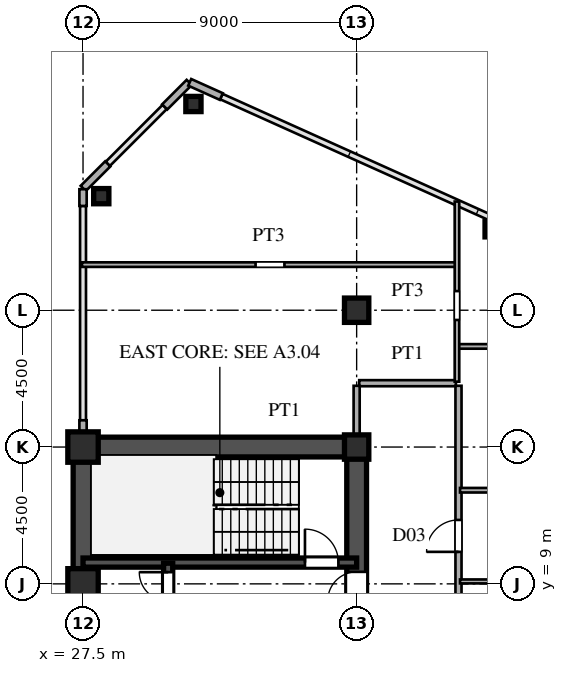
"""IFC4 building model, lengths in metres.
Left out: names, types, materials, properties, quantities, classifications, styles, units other than length and angle.
Written with IfcOpenShell. Run it as: python <this file> out.ifc"""

import sys

from ifc_helpers import new_model, si_unit, direction, frame, frame_2d, origin, origin_2d, place, context, subcontext, project, spatial, rectangle, hollow_rectangle, i_section, extrude, source, transform, mapped, element, fill, save


model = new_model("IFC4")
c1 = context("Model", 3, precision=1e-05, world=origin(), true_north=direction((0.0, 1.0)))
c2 = subcontext(c1, "Body", "Model", "MODEL_VIEW")
j1 = project(units=[si_unit("LENGTHUNIT", "METRE"), si_unit("PLANEANGLEUNIT", "RADIAN")], contexts=[c1])
p1 = place(None, origin())
s1 = spatial("IfcSite", under=j1, at=p1, CompositionType="ELEMENT")
p2 = place(p1, origin())
s2 = spatial("IfcBuilding", under=s1, at=p2, CompositionType="ELEMENT")
p3 = place(p2, frame((0.0, 0.0, 76.5)))
s3 = spatial("IfcBuildingStorey", under=s2, at=p3, CompositionType="ELEMENT", Elevation=76.5)
m1 = source(origin(), c2, "Body", "SweptSolid", [
    extrude(hollow_rectangle(XDim=1.0, YDim=1.0, WallThickness=0.042, at=origin_2d()), origin(), (0.0, 0.0, 1.0), 3.6),
])
for number, where, z_axis, x_axis in (
    (1, (27.5, 9.0, 0.0), (0.0, 0.0, 1.0), (1.0, 0.0, 0.0)),
    (2, (27.5, 13.5, 0.0), (0.0, 0.0, 1.0), (1.0, 0.0, 0.0)),
):
    element("IfcColumn", number, at=place(p3, frame(where, z_axis=z_axis, x_axis=x_axis)), inside=s3, PredefinedType="COLUMN", context=c2, shape_type="MappedRepresentation", body=[
        mapped(m1, transform((0.0, 0.0, 0.0), scale=1.0)),
    ])
m2 = source(origin(), c2, "Body", "SweptSolid", [
    extrude(i_section(OverallWidth=0.8, OverallDepth=0.8, WebThickness=0.032, FlangeThickness=0.05, at=origin_2d()), origin(), (0.0, 0.0, 1.0), 3.6),
])
for number, where, z_axis, x_axis in (
    (3, (36.5, 13.5, 0.0), (0.0, 0.0, 1.0), (1.0, 0.0, 0.0)),
    (4, (36.5, 18.0, 0.0), (0.0, 0.0, 1.0), (1.0, 0.0, 0.0)),
):
    element("IfcColumn", number, at=place(p3, frame(where, z_axis=z_axis, x_axis=x_axis)), inside=s3, PredefinedType="COLUMN", context=c2, shape_type="MappedRepresentation", body=[
        mapped(m2, transform((0.0, 0.0, 0.0), scale=1.0)),
    ])
m3 = source(origin(), c2, "Body", "SweptSolid", [
    extrude(hollow_rectangle(XDim=0.5, YDim=0.5, WallThickness=0.02, at=origin_2d()), origin(), (0.0, 0.0, 1.0), 3.6),
])
for number, where, z_axis, x_axis in (
    (5, (31.131, 24.783, 0.0), (0.0, 0.0, 1.0), (1.0, 0.0, 0.0)),
    (6, (28.1, 21.751, 0.0), (0.0, 0.0, 1.0), (1.0, 0.0, 0.0)),
    (7, (40.973, 20.661, 0.0), (0.0, 0.0, 1.0), (1.0, 0.0, 0.0)),
):
    element("IfcColumn", number, at=place(p3, frame(where, z_axis=z_axis, x_axis=x_axis)), inside=s3, PredefinedType="COLUMN", context=c2, shape_type="MappedRepresentation", body=[
        mapped(m3, transform((0.0, 0.0, 0.0), scale=1.0)),
    ])
p4 = place(p3, frame((32.049, 25.028, 0.0), z_axis=(0.0, 0.0, 1.0), x_axis=(-0.911929519623, 0.410346866979, 0.0)))
e8 = element("IfcWall", 8, at=p4, inside=s3, PredefinedType="SOLIDWALL", context=c2, shape_type="SweptSolid", body=[
    extrude(rectangle(XDim=1.14, YDim=0.24, at=frame_2d((0.57, 0.0))), origin(), (0.0, 0.0, 1.0), 3.38),
])
for number, where, z_axis, x_axis in (
    (9, (30.993, 25.493, 0.0), (0.0, 0.0, 1.0), (-0.707, -0.707, 0.0)),
    (10, (28.313, 22.813, 0.0), (0.0, 0.0, 1.0), (-0.707, -0.707, 0.0)),
):
    element("IfcWall", number, at=place(p3, frame(where, z_axis=z_axis, x_axis=x_axis)), inside=s3, PredefinedType="SOLIDWALL", context=c2, shape_type="SweptSolid", body=[
        extrude(rectangle(XDim=1.14, YDim=0.24, at=frame_2d((0.57, 0.0))), origin(), (0.0, 0.0, 1.0), 3.38),
    ])
p5 = place(p3, frame((27.5, 13.83, 0.0), z_axis=(0.0, 0.0, 1.0), x_axis=(0.0, 1.0, 0.0)))
e11 = element("IfcWall", 11, at=p5, inside=s3, PredefinedType="SOLIDWALL", context=c2, shape_type="SweptSolid", body=[
    extrude(rectangle(XDim=0.55, YDim=0.24, at=frame_2d((0.275, 0.0))), origin(), (0.0, 0.0, 1.0), 2.88),
])
p6 = place(p3, frame((27.5, 21.43, 0.0), z_axis=(0.0, 0.0, 1.0), x_axis=(0.0, 1.0, 0.0)))
e12 = element("IfcWall", 12, at=p6, inside=s3, PredefinedType="SOLIDWALL", context=c2, shape_type="SweptSolid", body=[
    extrude(rectangle(XDim=0.55, YDim=0.24, at=frame_2d((0.275, 0.0))), origin(), (0.0, 0.0, 1.0), 3.38),
])
p7 = place(p3, frame((27.5, 1.3, 0.0), z_axis=(0.0, 0.0, 1.0), x_axis=(0.0, 1.0, 0.0)))
e13 = element("IfcWall", 13, at=p7, inside=s3, PredefinedType="SHEAR", context=c2, shape_type="SweptSolid", body=[
    extrude(rectangle(XDim=12.2, YDim=0.65, at=frame_2d((6.1, 0.0))), origin(), (0.0, 0.0, 1.0), 3.38),
])
p8 = place(p3, frame((27.5, 13.5, 0.0), z_axis=(0.0, 0.0, 1.0), x_axis=(1.0, 0.0, 0.0)))
e14 = element("IfcWall", 14, at=p8, inside=s3, PredefinedType="SHEAR", context=c2, shape_type="SweptSolid", body=[
    extrude(rectangle(XDim=9.0, YDim=0.65, at=frame_2d((4.5, 0.0))), origin(), (0.0, 0.0, 1.0), 3.38),
])
p9 = place(p3, frame((36.5, 8.2, 0.0), z_axis=(0.0, 0.0, 1.0), x_axis=(0.0, 1.0, 0.0)))
e15 = element("IfcWall", 15, at=p9, inside=s3, PredefinedType="SHEAR", context=c2, shape_type="SweptSolid", body=[
    extrude(rectangle(XDim=5.45, YDim=0.65, at=frame_2d((2.725, 0.0))), origin(), (0.0, 0.0, 1.0), 3.38),
])
p10 = place(p9, frame((0.245, 0.0, 0.0)))
e16 = element("IfcOpeningElement", 16, at=p10, cuts=e15, PredefinedType="OPENING", context=c2, shape_type="SweptSolid", body=[
    extrude(rectangle(XDim=0.95, YDim=2.15, at=frame_2d((0.475, 1.075))), frame((0.0, 0.335, 0.0), z_axis=(0.0, -1.0, 0.0), x_axis=(1.0, 0.0, 0.0)), (0.0, 0.0, 1.0), 0.67),
])
p11 = place(p3, frame((27.5, 9.7, 0.0), z_axis=(0.0, 0.0, 1.0), x_axis=(1.0, 0.0, 0.0)))
e17 = element("IfcWall", 17, at=p11, inside=s3, PredefinedType="SHEAR", context=c2, shape_type="SweptSolid", body=[
    extrude(rectangle(XDim=9.0, YDim=0.3, at=frame_2d((4.5, 0.0))), origin(), (0.0, 0.0, 1.0), 3.38),
])
p12 = place(p11, frame((7.3, 0.0, 0.0)))
e18 = element("IfcOpeningElement", 18, at=p12, cuts=e17, PredefinedType="OPENING", context=c2, shape_type="SweptSolid", body=[
    extrude(rectangle(XDim=1.1, YDim=2.2, at=frame_2d((0.55, 1.1))), frame((0.0, 0.16, 0.0), z_axis=(0.0, -1.0, 0.0), x_axis=(1.0, 0.0, 0.0)), (0.0, 0.0, 1.0), 0.32),
])
p13 = place(p3, frame((30.3, 8.15, 0.0), z_axis=(0.0, 0.0, 1.0), x_axis=(0.0, 1.0, 0.0)))
e19 = element("IfcWall", 19, at=p13, inside=s3, PredefinedType="SHEAR", context=c2, shape_type="SweptSolid", body=[
    extrude(rectangle(XDim=1.53, YDim=0.3, at=frame_2d((0.765, 0.0))), origin(), (0.0, 0.0, 1.0), 3.38),
])
p14 = place(p13, frame((0.285, 0.0, 0.0)))
e20 = element("IfcOpeningElement", 20, at=p14, cuts=e19, PredefinedType="OPENING", context=c2, shape_type="SweptSolid", body=[
    extrude(rectangle(XDim=0.95, YDim=2.15, at=frame_2d((0.475, 1.075))), frame((0.0, 0.16, 0.0), z_axis=(0.0, -1.0, 0.0), x_axis=(1.0, 0.0, 0.0)), (0.0, 0.0, 1.0), 0.32),
])
p15 = place(p3, frame((39.9, 9.08, 0.0), z_axis=(0.0, 0.0, 1.0), x_axis=(1.0, 0.0, 0.0)))
e21 = element("IfcWall", 21, at=p15, inside=s3, PredefinedType="PARTITIONING", context=c2, shape_type="SweptSolid", body=[
    extrude(rectangle(XDim=5.55, YDim=0.13, at=frame_2d((2.775, 0.0))), origin(), (0.0, 0.0, 1.0), 3.38),
])
p16 = place(p15, frame((2.335, 0.0, 0.0)))
e22 = element("IfcOpeningElement", 22, at=p16, cuts=e21, PredefinedType="OPENING", context=c2, shape_type="SweptSolid", body=[
    extrude(rectangle(XDim=0.88, YDim=2.1, at=frame_2d((0.44, 1.05))), frame((0.0, 0.075, 0.0), z_axis=(0.0, -1.0, 0.0), x_axis=(1.0, 0.0, 0.0)), (0.0, 0.0, 1.0), 0.15),
])
p17 = place(p3, frame((39.9, 12.08, 0.0), z_axis=(0.0, 0.0, 1.0), x_axis=(1.0, 0.0, 0.0)))
e23 = element("IfcWall", 23, at=p17, inside=s3, PredefinedType="PARTITIONING", context=c2, shape_type="SweptSolid", body=[
    extrude(rectangle(XDim=5.55, YDim=0.15, at=frame_2d((2.775, 0.0))), origin(), (0.0, 0.0, 1.0), 3.38),
])
p18 = place(p17, frame((2.3, 0.0, 0.0)))
e24 = element("IfcOpeningElement", 24, at=p18, cuts=e23, PredefinedType="OPENING", context=c2, shape_type="SweptSolid", body=[
    extrude(rectangle(XDim=0.95, YDim=2.15, at=frame_2d((0.475, 1.075))), frame((0.0, 0.085, 0.0), z_axis=(0.0, -1.0, 0.0), x_axis=(1.0, 0.0, 0.0)), (0.0, 0.0, 1.0), 0.17),
])
p19 = place(p3, frame((36.585, 15.6, 0.0), z_axis=(0.0, 0.0, 1.0), x_axis=(1.0, 0.0, 0.0)))
e25 = element("IfcWall", 25, at=p19, inside=s3, PredefinedType="PARTITIONING", context=c2, shape_type="SweptSolid", body=[
    extrude(rectangle(XDim=3.18, YDim=0.2, at=frame_2d((1.59, 0.0))), origin(), (0.0, 0.0, 1.0), 3.38),
])
p20 = place(p3, frame((39.85, 16.81, 0.0), z_axis=(0.0, 0.0, 1.0), x_axis=(1.0, 0.0, 0.0)))
e26 = element("IfcWall", 26, at=p20, inside=s3, PredefinedType="PARTITIONING", context=c2, shape_type="SweptSolid", body=[
    extrude(rectangle(XDim=5.6, YDim=0.15, at=frame_2d((2.8, 0.0))), origin(), (0.0, 0.0, 1.0), 3.38),
])
p21 = place(p3, frame((27.465, 19.5, 0.0), z_axis=(0.0, 0.0, 1.0), x_axis=(1.0, 0.0, 0.0)))
e27 = element("IfcWall", 27, at=p21, inside=s3, PredefinedType="PARTITIONING", context=c2, shape_type="SweptSolid", body=[
    extrude(rectangle(XDim=12.285, YDim=0.15, at=frame_2d((6.143, 0.0))), origin(), (0.0, 0.0, 1.0), 3.38),
])
p22 = place(p21, frame((5.71, 0.0, 0.0)))
e28 = element("IfcOpeningElement", 28, at=p22, cuts=e27, PredefinedType="OPENING", context=c2, shape_type="SweptSolid", body=[
    extrude(rectangle(XDim=0.95, YDim=2.15, at=frame_2d((0.475, 1.075))), frame((0.0, 0.085, 0.0), z_axis=(0.0, -1.0, 0.0), x_axis=(1.0, 0.0, 0.0)), (0.0, 0.0, 1.0), 0.17),
])
p23 = place(p3, frame((36.5, 13.83, 0.0), z_axis=(0.0, 0.0, 1.0), x_axis=(0.0, 1.0, 0.0)))
e29 = element("IfcWall", 29, at=p23, inside=s3, PredefinedType="PARTITIONING", context=c2, shape_type="SweptSolid", body=[
    extrude(rectangle(XDim=1.685, YDim=0.2, at=frame_2d((0.842, 0.0))), origin(), (0.0, 0.0, 1.0), 2.68),
])
p24 = place(p3, frame((39.8, 15.65, 0.0), z_axis=(0.0, 0.0, 1.0), x_axis=(0.0, 1.0, 0.0)))
e30 = element("IfcWall", 30, at=p24, inside=s3, PredefinedType="PARTITIONING", context=c2, shape_type="SweptSolid", body=[
    extrude(rectangle(XDim=5.925, YDim=0.15, at=frame_2d((2.962, 0.0))), origin(), (0.0, 0.0, 1.0), 3.38),
])
p25 = place(p24, frame((2.029, 0.0, 0.0)))
e31 = element("IfcOpeningElement", 31, at=p25, cuts=e30, PredefinedType="OPENING", context=c2, shape_type="SweptSolid", body=[
    extrude(rectangle(XDim=0.95, YDim=2.15, at=frame_2d((0.475, 1.075))), frame((0.0, 0.085, 0.0), z_axis=(0.0, -1.0, 0.0), x_axis=(1.0, 0.0, 0.0)), (0.0, 0.0, 1.0), 0.17),
])
p26 = place(p3, frame((39.85, -15.515, 0.0), z_axis=(0.0, 0.0, 1.0), x_axis=(0.0, 1.0, 0.0)))
e32 = element("IfcWall", 32, at=p26, inside=s3, PredefinedType="PARTITIONING", context=c2, shape_type="SweptSolid", body=[
    extrude(rectangle(XDim=31.03, YDim=0.2, at=frame_2d((15.515, 0.0))), origin(), (0.0, 0.0, 1.0), 3.38),
])
p27 = place(p26, frame((2.94, 0.0, 0.0)))
e33 = element("IfcOpeningElement", 33, at=p27, cuts=e32, PredefinedType="OPENING", context=c2, shape_type="SweptSolid", body=[
    extrude(rectangle(XDim=1.05, YDim=2.25, at=frame_2d((0.525, 1.125))), frame((0.0, 0.11, 0.0), z_axis=(0.0, -1.0, 0.0), x_axis=(1.0, 0.0, 0.0)), (0.0, 0.0, 1.0), 0.22),
])
p28 = place(p26, frame((13.28, 0.0, 0.0)))
e34 = element("IfcOpeningElement", 34, at=p28, cuts=e32, PredefinedType="OPENING", context=c2, shape_type="SweptSolid", body=[
    extrude(rectangle(XDim=1.05, YDim=2.25, at=frame_2d((0.525, 1.125))), frame((0.0, 0.11, 0.0), z_axis=(0.0, -1.0, 0.0), x_axis=(1.0, 0.0, 0.0)), (0.0, 0.0, 1.0), 0.22),
])
p29 = place(p26, frame((25.567, 0.0, 0.0)))
e35 = element("IfcOpeningElement", 35, at=p29, cuts=e32, PredefinedType="OPENING", context=c2, shape_type="SweptSolid", body=[
    extrude(rectangle(XDim=1.05, YDim=2.25, at=frame_2d((0.525, 1.125))), frame((0.0, 0.11, 0.0), z_axis=(0.0, -1.0, 0.0), x_axis=(1.0, 0.0, 0.0)), (0.0, 0.0, 1.0), 0.22),
])
m4 = source(origin(), c2, "Body", "SweptSolid", [
    extrude(rectangle(XDim=0.95, YDim=2.15, at=frame_2d((0.475, 1.075))), frame((0.0, 0.025, 0.0), z_axis=(0.0, -1.0, 0.0), x_axis=(1.0, 0.0, 0.0)), (0.0, 0.0, 1.0), 0.05),
])
p30 = place(p10, origin())
e36 = element("IfcDoor", 36, at=p30, inside=s3, OperationType="SINGLE_SWING_LEFT", PredefinedType="DOOR", context=c2, shape_type="MappedRepresentation", body=[
    mapped(m4, transform((0.0, 0.0, 0.0), scale=1.0)),
])
fill(e16, e36)
m5 = source(origin(), c2, "Body", "SweptSolid", [
    extrude(rectangle(XDim=1.1, YDim=2.2, at=frame_2d((0.55, 1.1))), frame((0.0, 0.025, 0.0), z_axis=(0.0, -1.0, 0.0), x_axis=(1.0, 0.0, 0.0)), (0.0, 0.0, 1.0), 0.05),
])
p31 = place(p12, origin())
e37 = element("IfcDoor", 37, at=p31, inside=s3, OperationType="SINGLE_SWING_LEFT", PredefinedType="DOOR", context=c2, shape_type="MappedRepresentation", body=[
    mapped(m5, transform((0.0, 0.0, 0.0), scale=1.0)),
])
fill(e18, e37)
p32 = place(p14, origin())
e38 = element("IfcDoor", 38, at=p32, inside=s3, OperationType="SINGLE_SWING_RIGHT", PredefinedType="DOOR", context=c2, shape_type="MappedRepresentation", body=[
    mapped(m4, transform((0.0, 0.0, 0.0), scale=1.0)),
])
fill(e20, e38)
m6 = source(origin(), c2, "Body", "SweptSolid", [
    extrude(rectangle(XDim=1.05, YDim=2.25, at=frame_2d((0.525, 1.125))), frame((0.0, 0.025, 0.0), z_axis=(0.0, -1.0, 0.0), x_axis=(1.0, 0.0, 0.0)), (0.0, 0.0, 1.0), 0.05),
])
p33 = place(p29, origin())
e39 = element("IfcDoor", 39, at=p33, inside=s3, OperationType="SINGLE_SWING_LEFT", PredefinedType="DOOR", context=c2, shape_type="MappedRepresentation", body=[
    mapped(m6, transform((0.0, 0.0, 0.0), scale=1.0)),
])
fill(e35, e39)
save(model, sys.argv[1])
